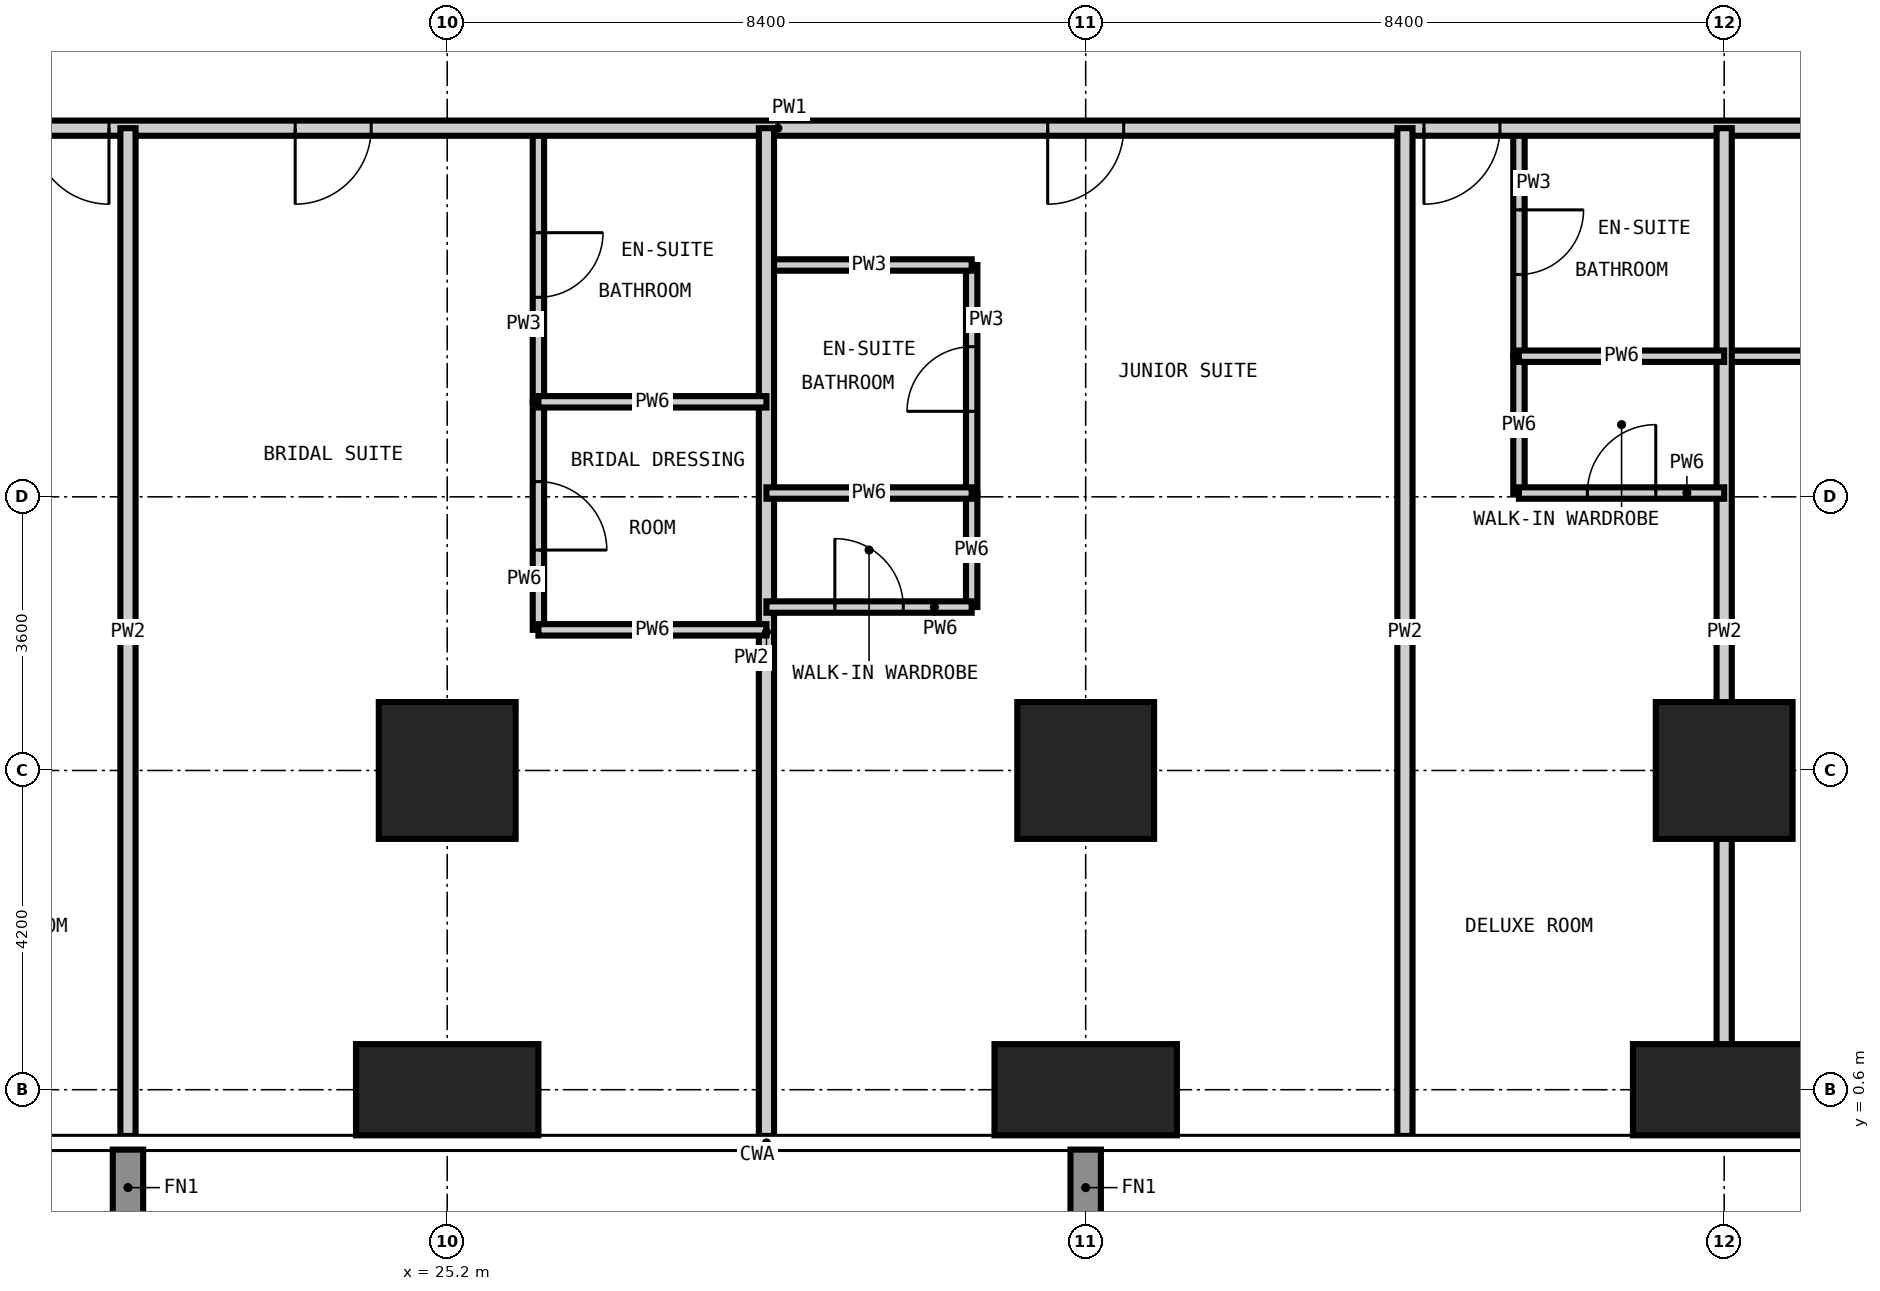
"""IFC4 building model, lengths in metres.
Left out: names, types, materials, properties, quantities, classifications, styles, units other than length and angle.
Written with IfcOpenShell. Run it as: python <this file> out.ifc"""

import sys

from ifc_helpers import new_model, si_unit, direction, frame, frame_2d, origin, origin_2d, place, context, subcontext, project, spatial, rectangle, extrude, element, fill, save


model = new_model("IFC4")
c1 = context("Model", 3, precision=1e-05, world=origin(), true_north=direction((0.0, 1.0)))
c2 = subcontext(c1, "Body", "Model", "MODEL_VIEW")
j1 = project(units=[si_unit("LENGTHUNIT", "METRE"), si_unit("PLANEANGLEUNIT", "RADIAN")], contexts=[c1])
p1 = place(None, origin())
s1 = spatial("IfcSite", under=j1, at=p1, CompositionType="ELEMENT")
p2 = place(p1, origin())
s2 = spatial("IfcBuilding", under=s1, at=p2, CompositionType="ELEMENT")
p3 = place(p2, frame((0.0, 0.0, 34.2)))
s3 = spatial("IfcBuildingStorey", under=s2, at=p3, CompositionType="ELEMENT", Elevation=34.2)
p4 = place(p3, frame((25.2, 0.6, -0.35), z_axis=(0.0, 0.0, 1.0), x_axis=(1.0, 0.0, 0.0)))
e1 = element("IfcColumn", 1, at=p4, inside=s3, PredefinedType="COLUMN", context=c2, shape_type="SweptSolid", body=[
    extrude(rectangle(XDim=2.4, YDim=1.2, at=origin_2d()), origin(), (0.0, 0.0, 1.0), 3.6),
])
p5 = place(p3, frame((25.2, 4.8, -0.35), z_axis=(0.0, 0.0, 1.0), x_axis=(1.0, 0.0, 0.0)))
e2 = element("IfcColumn", 2, at=p5, inside=s3, PredefinedType="COLUMN", context=c2, shape_type="SweptSolid", body=[
    extrude(rectangle(XDim=1.8, YDim=1.8, at=origin_2d()), origin(), (0.0, 0.0, 1.0), 3.6),
])
p6 = place(p3, frame((33.6, 0.6, -0.35), z_axis=(0.0, 0.0, 1.0), x_axis=(1.0, 0.0, 0.0)))
e3 = element("IfcColumn", 3, at=p6, inside=s3, PredefinedType="COLUMN", context=c2, shape_type="SweptSolid", body=[
    extrude(rectangle(XDim=2.4, YDim=1.2, at=origin_2d()), origin(), (0.0, 0.0, 1.0), 3.6),
])
p7 = place(p3, frame((33.6, 4.8, -0.35), z_axis=(0.0, 0.0, 1.0), x_axis=(1.0, 0.0, 0.0)))
e4 = element("IfcColumn", 4, at=p7, inside=s3, PredefinedType="COLUMN", context=c2, shape_type="SweptSolid", body=[
    extrude(rectangle(XDim=1.8, YDim=1.8, at=origin_2d()), origin(), (0.0, 0.0, 1.0), 3.6),
])
p8 = place(p3, frame((42.0, 0.6, -0.35), z_axis=(0.0, 0.0, 1.0), x_axis=(1.0, 0.0, 0.0)))
e5 = element("IfcColumn", 5, at=p8, inside=s3, PredefinedType="COLUMN", context=c2, shape_type="SweptSolid", body=[
    extrude(rectangle(XDim=2.4, YDim=1.2, at=origin_2d()), origin(), (0.0, 0.0, 1.0), 3.6),
])
p9 = place(p3, frame((42.0, 4.8, -0.35), z_axis=(0.0, 0.0, 1.0), x_axis=(1.0, 0.0, 0.0)))
e6 = element("IfcColumn", 6, at=p9, inside=s3, PredefinedType="COLUMN", context=c2, shape_type="SweptSolid", body=[
    extrude(rectangle(XDim=1.8, YDim=1.8, at=origin_2d()), origin(), (0.0, 0.0, 1.0), 3.6),
])
p10 = place(p3, frame((26.4, 9.65, 0.0), z_axis=(0.0, 0.0, 1.0), x_axis=(0.0, 1.0, 0.0)))
e7 = element("IfcWall", 7, at=p10, inside=s3, PredefinedType="PARTITIONING", context=c2, shape_type="SweptSolid", body=[
    extrude(rectangle(XDim=3.6, YDim=0.15, at=frame_2d((1.8, 0.0))), origin(), (0.0, 0.0, 1.0), 3.25),
])
p11 = place(p10, frame((1.375, 0.0, 0.0)))
e8 = element("IfcOpeningElement", 8, at=p11, cuts=e7, PredefinedType="OPENING", context=c2, shape_type="SweptSolid", body=[
    extrude(rectangle(XDim=0.85, YDim=2.1, at=frame_2d((0.425, 1.05))), frame((0.0, 0.085, 0.0), z_axis=(0.0, -1.0, 0.0), x_axis=(1.0, 0.0, 0.0)), (0.0, 0.0, 1.0), 0.17),
])
p12 = place(p3, frame((32.1, 8.45, 0.0), z_axis=(0.0, 0.0, 1.0), x_axis=(0.0, 1.0, 0.0)))
e9 = element("IfcWall", 9, at=p12, inside=s3, PredefinedType="PARTITIONING", context=c2, shape_type="SweptSolid", body=[
    extrude(rectangle(XDim=3.0, YDim=0.15, at=frame_2d((1.5, 0.0))), origin(), (0.0, 0.0, 1.0), 3.25),
])
p13 = place(p12, frame((1.075, 0.0, 0.0)))
e10 = element("IfcOpeningElement", 10, at=p13, cuts=e9, PredefinedType="OPENING", context=c2, shape_type="SweptSolid", body=[
    extrude(rectangle(XDim=0.85, YDim=2.1, at=frame_2d((0.425, 1.05))), frame((0.0, 0.085, 0.0), z_axis=(0.0, -1.0, 0.0), x_axis=(1.0, 0.0, 0.0)), (0.0, 0.0, 1.0), 0.17),
])
p14 = place(p3, frame((39.3, 10.25, 0.0), z_axis=(0.0, 0.0, 1.0), x_axis=(0.0, 1.0, 0.0)))
e11 = element("IfcWall", 11, at=p14, inside=s3, PredefinedType="PARTITIONING", context=c2, shape_type="SweptSolid", body=[
    extrude(rectangle(XDim=3.0, YDim=0.15, at=frame_2d((1.5, 0.0))), origin(), (0.0, 0.0, 1.0), 3.25),
])
p15 = place(p14, frame((1.075, 0.0, 0.0)))
e12 = element("IfcOpeningElement", 12, at=p15, cuts=e11, PredefinedType="OPENING", context=c2, shape_type="SweptSolid", body=[
    extrude(rectangle(XDim=0.85, YDim=2.1, at=frame_2d((0.425, 1.05))), frame((0.0, 0.085, 0.0), z_axis=(0.0, -1.0, 0.0), x_axis=(1.0, 0.0, 0.0)), (0.0, 0.0, 1.0), 0.17),
])
p16 = place(p3, frame((42.0, 10.25, 0.0), z_axis=(0.0, 0.0, 1.0), x_axis=(1.0, 0.0, 0.0)))
e13 = element("IfcWall", 13, at=p16, inside=s3, PredefinedType="PARTITIONING", context=c2, shape_type="SweptSolid", body=[
    extrude(rectangle(XDim=3.85, YDim=0.15, at=frame_2d((1.925, 0.0))), origin(), (0.0, 0.0, 1.0), 3.25),
])
p17 = place(p16, frame((1.5, 0.0, 0.0)))
e14 = element("IfcOpeningElement", 14, at=p17, cuts=e13, PredefinedType="OPENING", context=c2, shape_type="SweptSolid", body=[
    extrude(rectangle(XDim=0.85, YDim=2.1, at=frame_2d((0.425, 1.05))), frame((0.0, 0.085, 0.0), z_axis=(0.0, -1.0, 0.0), x_axis=(1.0, 0.0, 0.0)), (0.0, 0.0, 1.0), 0.17),
])
p18 = place(p3, frame((29.4, 11.45, 0.0), z_axis=(0.0, 0.0, 1.0), x_axis=(1.0, 0.0, 0.0)))
e15 = element("IfcWall", 15, at=p18, inside=s3, PredefinedType="PARTITIONING", context=c2, shape_type="SweptSolid", body=[
    extrude(rectangle(XDim=2.7, YDim=0.15, at=frame_2d((1.35, 0.0))), origin(), (0.0, 0.0, 1.0), 3.25),
])
p19 = place(p3, frame((45.85, 13.25, 0.0), z_axis=(0.0, 0.0, 1.0), x_axis=(-1.0, 0.0, 0.0)))
e16 = element("IfcWall", 16, at=p19, inside=s3, PredefinedType="PARTITIONING", context=c2, shape_type="SweptSolid", body=[
    extrude(rectangle(XDim=32.6, YDim=0.2, at=frame_2d((16.3, 0.0))), origin(), (0.0, 0.0, 1.0), 3.25),
])
p20 = place(p19, frame((25.1, 0.0, 0.0)))
e17 = element("IfcOpeningElement", 17, at=p20, cuts=e16, PredefinedType="OPENING", context=c2, shape_type="SweptSolid", body=[
    extrude(rectangle(XDim=1.0, YDim=2.2, at=frame_2d((0.5, 1.1))), frame((0.0, 0.11, 0.0), z_axis=(0.0, -1.0, 0.0), x_axis=(1.0, 0.0, 0.0)), (0.0, 0.0, 1.0), 0.22),
])
p21 = place(p19, frame((21.65, 0.0, 0.0)))
e18 = element("IfcOpeningElement", 18, at=p21, cuts=e16, PredefinedType="OPENING", context=c2, shape_type="SweptSolid", body=[
    extrude(rectangle(XDim=1.0, YDim=2.2, at=frame_2d((0.5, 1.1))), frame((0.0, 0.11, 0.0), z_axis=(0.0, -1.0, 0.0), x_axis=(1.0, 0.0, 0.0)), (0.0, 0.0, 1.0), 0.22),
])
p22 = place(p19, frame((11.75, 0.0, 0.0)))
e19 = element("IfcOpeningElement", 19, at=p22, cuts=e16, PredefinedType="OPENING", context=c2, shape_type="SweptSolid", body=[
    extrude(rectangle(XDim=1.0, YDim=2.2, at=frame_2d((0.5, 1.1))), frame((0.0, 0.11, 0.0), z_axis=(0.0, -1.0, 0.0), x_axis=(1.0, 0.0, 0.0)), (0.0, 0.0, 1.0), 0.22),
])
p23 = place(p19, frame((6.8, 0.0, 0.0)))
e20 = element("IfcOpeningElement", 20, at=p23, cuts=e16, PredefinedType="OPENING", context=c2, shape_type="SweptSolid", body=[
    extrude(rectangle(XDim=1.0, YDim=2.2, at=frame_2d((0.5, 1.1))), frame((0.0, 0.11, 0.0), z_axis=(0.0, -1.0, 0.0), x_axis=(1.0, 0.0, 0.0)), (0.0, 0.0, 1.0), 0.22),
])
for number, where, z_axis, x_axis in (
    (21, (21.0, -0.008, 0.0), (0.0, 0.0, 1.0), (0.0, 1.0, 0.0)),
    (22, (29.4, -0.008, 0.0), (0.0, 0.0, 1.0), (0.0, 1.0, 0.0)),
    (23, (37.8, -0.008, 0.0), (0.0, 0.0, 1.0), (0.0, 1.0, 0.0)),
    (24, (42.0, -0.008, 0.0), (0.0, 0.0, 1.0), (0.0, 1.0, 0.0)),
):
    element("IfcWall", number, at=place(p3, frame(where, z_axis=z_axis, x_axis=x_axis)), inside=s3, PredefinedType="PARTITIONING", context=c2, shape_type="SweptSolid", body=[
        extrude(rectangle(XDim=13.258, YDim=0.2, at=frame_2d((6.629, 0.0))), origin(), (0.0, 0.0, 1.0), 3.25),
    ])
p24 = place(p3, frame((26.4, 6.65, 0.0), z_axis=(0.0, 0.0, 1.0), x_axis=(0.0, 1.0, 0.0)))
e25 = element("IfcWall", 25, at=p24, inside=s3, PredefinedType="PARTITIONING", context=c2, shape_type="SweptSolid", body=[
    extrude(rectangle(XDim=3.0, YDim=0.15, at=frame_2d((1.5, 0.0))), origin(), (0.0, 0.0, 1.0), 3.25),
])
p25 = place(p24, frame((1.05, 0.0, 0.0)))
e26 = element("IfcOpeningElement", 26, at=p25, cuts=e25, PredefinedType="OPENING", context=c2, shape_type="SweptSolid", body=[
    extrude(rectangle(XDim=0.9, YDim=2.1, at=frame_2d((0.45, 1.05))), frame((0.0, 0.085, 0.0), z_axis=(0.0, -1.0, 0.0), x_axis=(1.0, 0.0, 0.0)), (0.0, 0.0, 1.0), 0.17),
])
p26 = place(p3, frame((32.1, 6.95, 0.0), z_axis=(0.0, 0.0, 1.0), x_axis=(0.0, 1.0, 0.0)))
e27 = element("IfcWall", 27, at=p26, inside=s3, PredefinedType="PARTITIONING", context=c2, shape_type="SweptSolid", body=[
    extrude(rectangle(XDim=1.5, YDim=0.15, at=frame_2d((0.75, 0.0))), origin(), (0.0, 0.0, 1.0), 3.25),
])
p27 = place(p3, frame((39.3, 8.45, 0.0), z_axis=(0.0, 0.0, 1.0), x_axis=(0.0, 1.0, 0.0)))
e28 = element("IfcWall", 28, at=p27, inside=s3, PredefinedType="PARTITIONING", context=c2, shape_type="SweptSolid", body=[
    extrude(rectangle(XDim=1.8, YDim=0.15, at=frame_2d((0.9, 0.0))), origin(), (0.0, 0.0, 1.0), 3.25),
])
p28 = place(p3, frame((26.4, 6.65, 0.0), z_axis=(0.0, 0.0, 1.0), x_axis=(1.0, 0.0, 0.0)))
e29 = element("IfcWall", 29, at=p28, inside=s3, PredefinedType="PARTITIONING", context=c2, shape_type="SweptSolid", body=[
    extrude(rectangle(XDim=3.0, YDim=0.15, at=frame_2d((1.5, 0.0))), origin(), (0.0, 0.0, 1.0), 3.25),
])
p29 = place(p3, frame((29.4, 6.95, 0.0), z_axis=(0.0, 0.0, 1.0), x_axis=(1.0, 0.0, 0.0)))
e30 = element("IfcWall", 30, at=p29, inside=s3, PredefinedType="PARTITIONING", context=c2, shape_type="SweptSolid", body=[
    extrude(rectangle(XDim=2.7, YDim=0.15, at=frame_2d((1.35, 0.0))), origin(), (0.0, 0.0, 1.0), 3.25),
])
p30 = place(p29, frame((0.9, 0.0, 0.0)))
e31 = element("IfcOpeningElement", 31, at=p30, cuts=e30, PredefinedType="OPENING", context=c2, shape_type="SweptSolid", body=[
    extrude(rectangle(XDim=0.9, YDim=2.1, at=frame_2d((0.45, 1.05))), frame((0.0, 0.085, 0.0), z_axis=(0.0, -1.0, 0.0), x_axis=(1.0, 0.0, 0.0)), (0.0, 0.0, 1.0), 0.17),
])
p31 = place(p3, frame((29.4, 8.45, 0.0), z_axis=(0.0, 0.0, 1.0), x_axis=(1.0, 0.0, 0.0)))
e32 = element("IfcWall", 32, at=p31, inside=s3, PredefinedType="PARTITIONING", context=c2, shape_type="SweptSolid", body=[
    extrude(rectangle(XDim=2.7, YDim=0.15, at=frame_2d((1.35, 0.0))), origin(), (0.0, 0.0, 1.0), 3.25),
])
p32 = place(p3, frame((39.3, 8.45, 0.0), z_axis=(0.0, 0.0, 1.0), x_axis=(1.0, 0.0, 0.0)))
e33 = element("IfcWall", 33, at=p32, inside=s3, PredefinedType="PARTITIONING", context=c2, shape_type="SweptSolid", body=[
    extrude(rectangle(XDim=2.7, YDim=0.15, at=frame_2d((1.35, 0.0))), origin(), (0.0, 0.0, 1.0), 3.25),
])
p33 = place(p32, frame((0.9, 0.0, 0.0)))
e34 = element("IfcOpeningElement", 34, at=p33, cuts=e33, PredefinedType="OPENING", context=c2, shape_type="SweptSolid", body=[
    extrude(rectangle(XDim=0.9, YDim=2.1, at=frame_2d((0.45, 1.05))), frame((0.0, 0.085, 0.0), z_axis=(0.0, -1.0, 0.0), x_axis=(1.0, 0.0, 0.0)), (0.0, 0.0, 1.0), 0.17),
])
p34 = place(p3, frame((26.4, 9.65, 0.0), z_axis=(0.0, 0.0, 1.0), x_axis=(1.0, 0.0, 0.0)))
e35 = element("IfcWall", 35, at=p34, inside=s3, PredefinedType="PARTITIONING", context=c2, shape_type="SweptSolid", body=[
    extrude(rectangle(XDim=3.0, YDim=0.15, at=frame_2d((1.5, 0.0))), origin(), (0.0, 0.0, 1.0), 3.25),
])
p35 = place(p3, frame((39.3, 10.25, 0.0), z_axis=(0.0, 0.0, 1.0), x_axis=(1.0, 0.0, 0.0)))
e36 = element("IfcWall", 36, at=p35, inside=s3, PredefinedType="PARTITIONING", context=c2, shape_type="SweptSolid", body=[
    extrude(rectangle(XDim=2.7, YDim=0.15, at=frame_2d((1.35, 0.0))), origin(), (0.0, 0.0, 1.0), 3.25),
])
p36 = place(p20, origin())
e37 = element("IfcDoor", 37, at=p36, inside=s3, OperationType="SINGLE_SWING_LEFT", PredefinedType="DOOR", context=c2, shape_type="SweptSolid", body=[
    extrude(rectangle(XDim=1.0, YDim=2.2, at=frame_2d((0.5, 1.1))), frame((0.0, 0.025, 0.0), z_axis=(0.0, -1.0, 0.0), x_axis=(1.0, 0.0, 0.0)), (0.0, 0.0, 1.0), 0.05),
])
fill(e17, e37)
p37 = place(p21, origin())
e38 = element("IfcDoor", 38, at=p37, inside=s3, OperationType="SINGLE_SWING_RIGHT", PredefinedType="DOOR", context=c2, shape_type="SweptSolid", body=[
    extrude(rectangle(XDim=1.0, YDim=2.2, at=frame_2d((0.5, 1.1))), frame((0.0, 0.025, 0.0), z_axis=(0.0, -1.0, 0.0), x_axis=(1.0, 0.0, 0.0)), (0.0, 0.0, 1.0), 0.05),
])
fill(e18, e38)
p38 = place(p11, frame((0.85, 0.0, 0.0), z_axis=(0.0, 0.0, 1.0), x_axis=(-1.0, 0.0, 0.0)))
e39 = element("IfcDoor", 39, at=p38, inside=s3, OperationType="SINGLE_SWING_LEFT", PredefinedType="DOOR", context=c2, shape_type="SweptSolid", body=[
    extrude(rectangle(XDim=0.85, YDim=2.1, at=frame_2d((0.425, 1.05))), frame((0.0, 0.025, 0.0), z_axis=(0.0, -1.0, 0.0), x_axis=(1.0, 0.0, 0.0)), (0.0, 0.0, 1.0), 0.05),
])
fill(e8, e39)
p39 = place(p25, frame((0.9, 0.0, 0.0), z_axis=(0.0, 0.0, 1.0), x_axis=(-1.0, 0.0, 0.0)))
e40 = element("IfcDoor", 40, at=p39, inside=s3, OperationType="SINGLE_SWING_RIGHT", PredefinedType="DOOR", context=c2, shape_type="SweptSolid", body=[
    extrude(rectangle(XDim=0.9, YDim=2.1, at=frame_2d((0.45, 1.05))), frame((0.0, 0.025, 0.0), z_axis=(0.0, -1.0, 0.0), x_axis=(1.0, 0.0, 0.0)), (0.0, 0.0, 1.0), 0.05),
])
fill(e26, e40)
p40 = place(p22, origin())
e41 = element("IfcDoor", 41, at=p40, inside=s3, OperationType="SINGLE_SWING_RIGHT", PredefinedType="DOOR", context=c2, shape_type="SweptSolid", body=[
    extrude(rectangle(XDim=1.0, YDim=2.2, at=frame_2d((0.5, 1.1))), frame((0.0, 0.025, 0.0), z_axis=(0.0, -1.0, 0.0), x_axis=(1.0, 0.0, 0.0)), (0.0, 0.0, 1.0), 0.05),
])
fill(e19, e41)
p41 = place(p13, origin())
e42 = element("IfcDoor", 42, at=p41, inside=s3, OperationType="SINGLE_SWING_LEFT", PredefinedType="DOOR", context=c2, shape_type="SweptSolid", body=[
    extrude(rectangle(XDim=0.85, YDim=2.1, at=frame_2d((0.425, 1.05))), frame((0.0, 0.025, 0.0), z_axis=(0.0, -1.0, 0.0), x_axis=(1.0, 0.0, 0.0)), (0.0, 0.0, 1.0), 0.05),
])
fill(e10, e42)
p42 = place(p30, origin())
e43 = element("IfcDoor", 43, at=p42, inside=s3, OperationType="SINGLE_SWING_LEFT", PredefinedType="DOOR", context=c2, shape_type="SweptSolid", body=[
    extrude(rectangle(XDim=0.9, YDim=2.1, at=frame_2d((0.45, 1.05))), frame((0.0, 0.025, 0.0), z_axis=(0.0, -1.0, 0.0), x_axis=(1.0, 0.0, 0.0)), (0.0, 0.0, 1.0), 0.05),
])
fill(e31, e43)
p43 = place(p23, origin())
e44 = element("IfcDoor", 44, at=p43, inside=s3, OperationType="SINGLE_SWING_RIGHT", PredefinedType="DOOR", context=c2, shape_type="SweptSolid", body=[
    extrude(rectangle(XDim=1.0, YDim=2.2, at=frame_2d((0.5, 1.1))), frame((0.0, 0.025, 0.0), z_axis=(0.0, -1.0, 0.0), x_axis=(1.0, 0.0, 0.0)), (0.0, 0.0, 1.0), 0.05),
])
fill(e20, e44)
p44 = place(p15, frame((0.85, 0.0, 0.0), z_axis=(0.0, 0.0, 1.0), x_axis=(-1.0, 0.0, 0.0)))
e45 = element("IfcDoor", 45, at=p44, inside=s3, OperationType="SINGLE_SWING_LEFT", PredefinedType="DOOR", context=c2, shape_type="SweptSolid", body=[
    extrude(rectangle(XDim=0.85, YDim=2.1, at=frame_2d((0.425, 1.05))), frame((0.0, 0.025, 0.0), z_axis=(0.0, -1.0, 0.0), x_axis=(1.0, 0.0, 0.0)), (0.0, 0.0, 1.0), 0.05),
])
fill(e12, e45)
p45 = place(p33, origin())
e46 = element("IfcDoor", 46, at=p45, inside=s3, OperationType="SINGLE_SWING_RIGHT", PredefinedType="DOOR", context=c2, shape_type="SweptSolid", body=[
    extrude(rectangle(XDim=0.9, YDim=2.1, at=frame_2d((0.45, 1.05))), frame((0.0, 0.025, 0.0), z_axis=(0.0, -1.0, 0.0), x_axis=(1.0, 0.0, 0.0)), (0.0, 0.0, 1.0), 0.05),
])
fill(e34, e46)
save(model, sys.argv[1])
